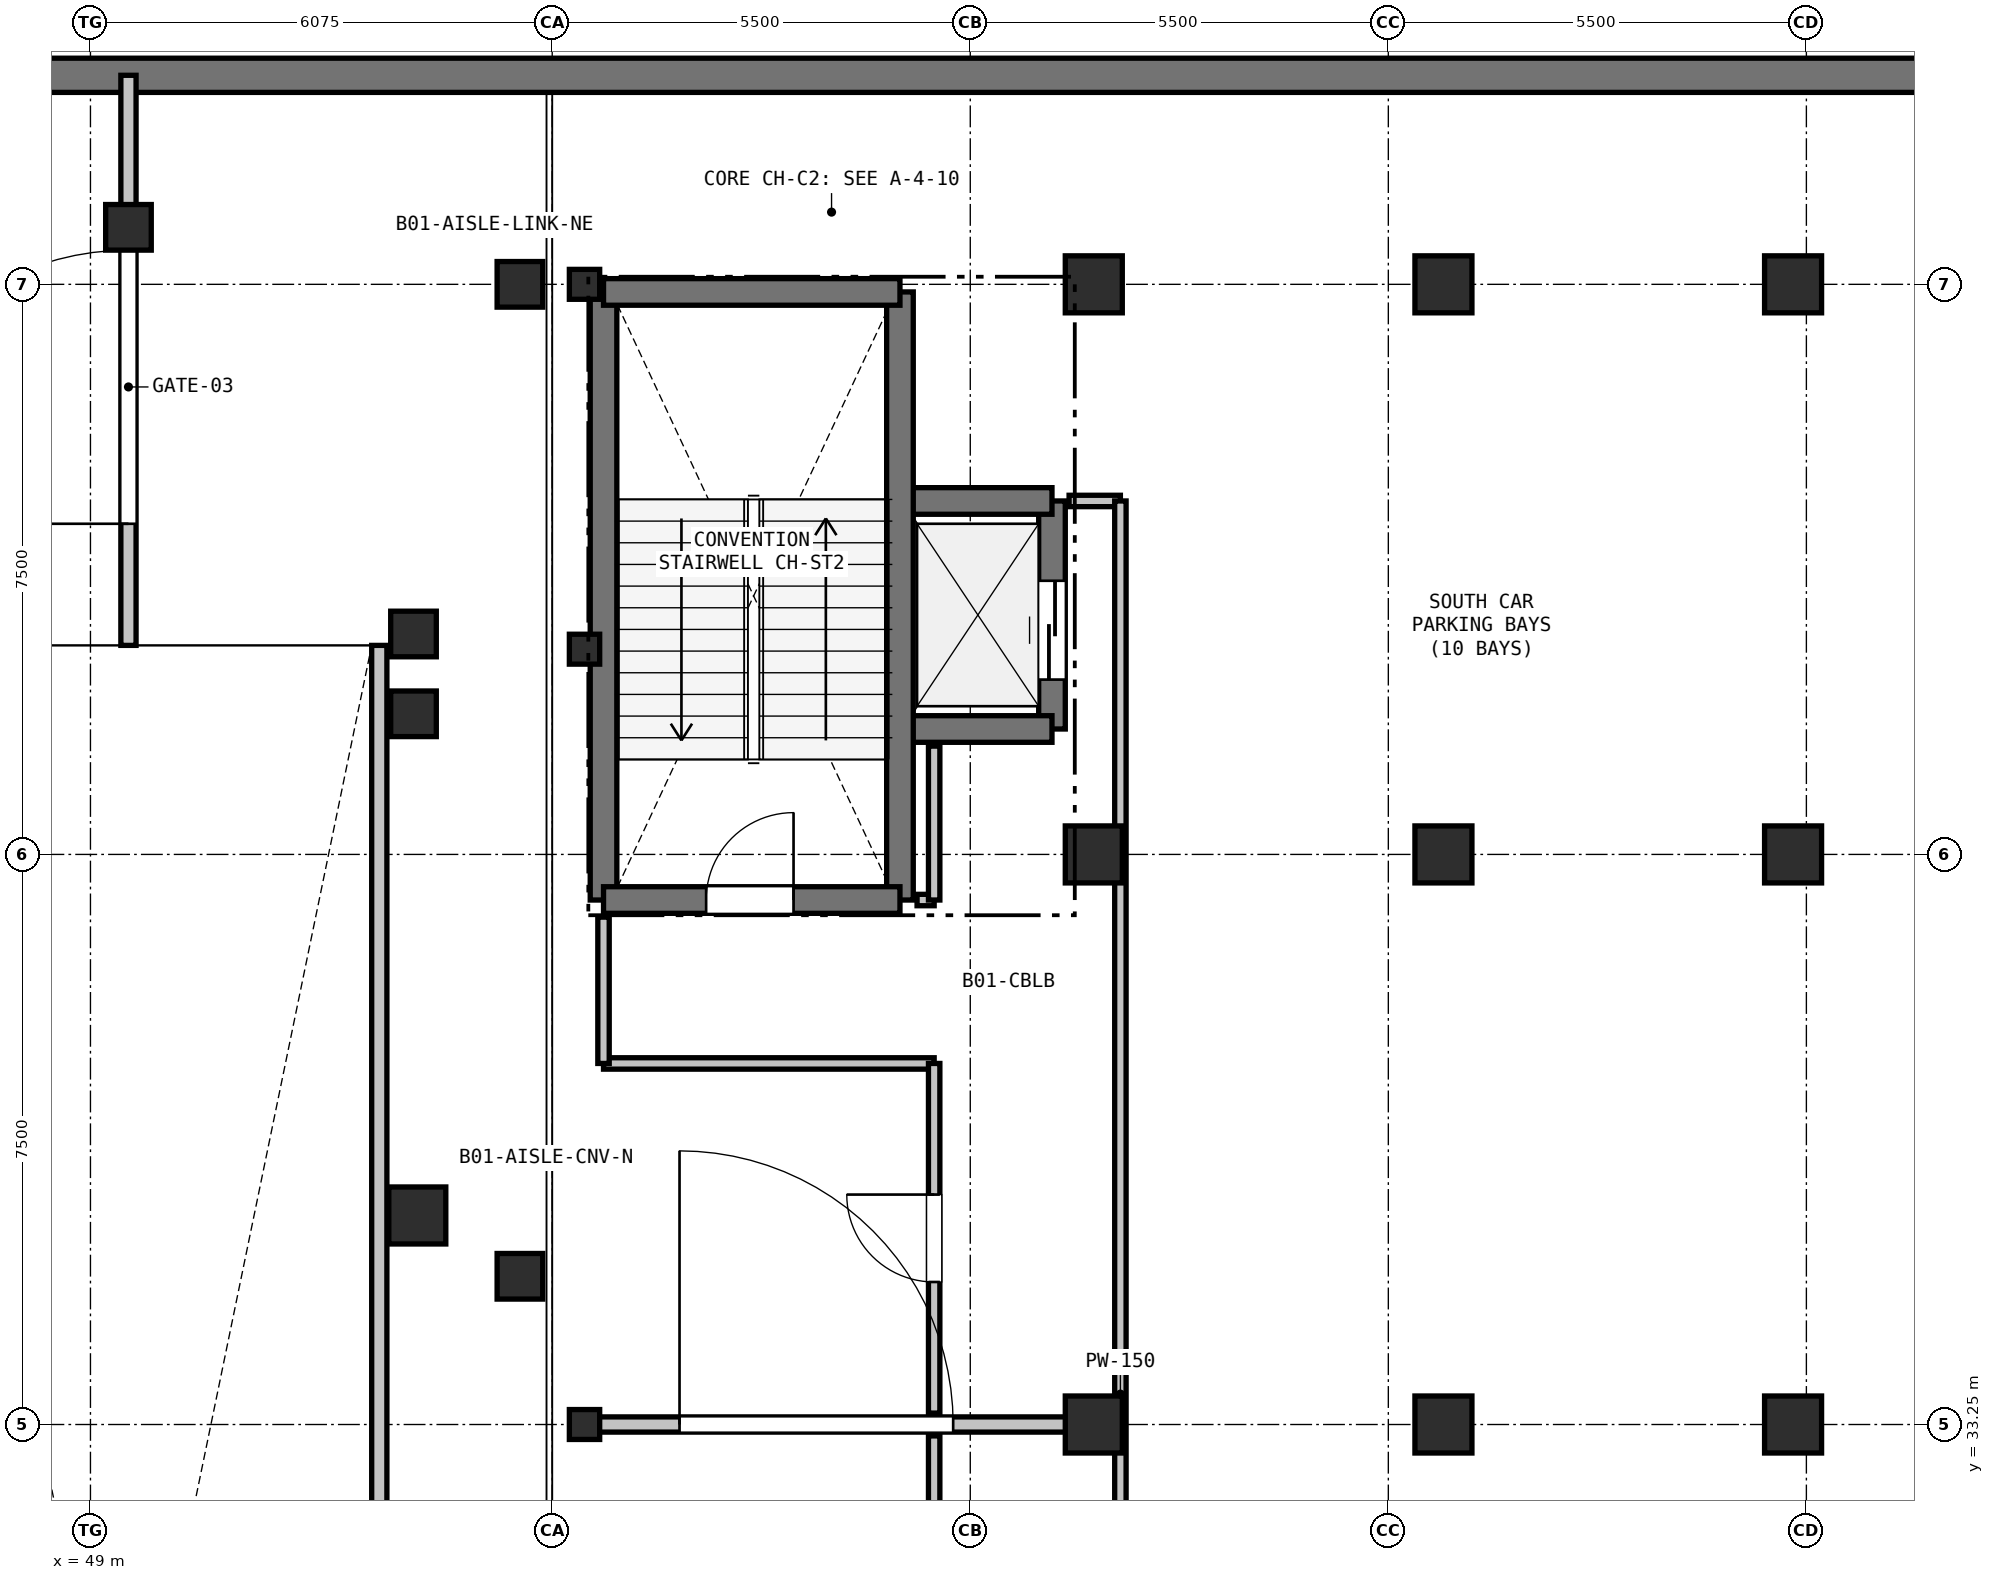
"""IFC4 building model, lengths in metres.
Left out: names, types, materials, properties, quantities, classifications, styles, units other than length and angle.
Written with IfcOpenShell. Run it as: python <this file> out.ifc"""

import sys

from ifc_helpers import new_model, si_unit, direction, frame, frame_2d, origin, origin_2d, place, context, subcontext, project, spatial, rectangle, i_section, extrude, element, fill, save


model = new_model("IFC4")
c1 = context("Model", 3, precision=1e-05, world=origin(), true_north=direction((0.0, 1.0)))
c2 = subcontext(c1, "Body", "Model", "MODEL_VIEW")
j1 = project(units=[si_unit("LENGTHUNIT", "METRE"), si_unit("PLANEANGLEUNIT", "RADIAN")], contexts=[c1])
p1 = place(None, origin())
s1 = spatial("IfcSite", under=j1, at=p1, CompositionType="ELEMENT")
p2 = place(p1, origin())
s2 = spatial("IfcBuilding", under=s1, at=p2, CompositionType="ELEMENT")
p3 = place(p2, frame((0.0, 0.0, -4.5)))
s3 = spatial("IfcBuildingStorey", under=s2, at=p3, CompositionType="ELEMENT", Elevation=-4.5)
p4 = place(p3, frame((77.0, 51.0, 0.0), z_axis=(0.0, 0.0, 1.0), x_axis=(-1.0, 0.0, 0.0)))
e1 = element("IfcWall", 1, at=p4, inside=s3, PredefinedType="USERDEFINED", context=c2, shape_type="SweptSolid", body=[
    extrude(rectangle(XDim=81.5, YDim=0.45, at=frame_2d((40.75, 0.0))), origin(), (0.0, 0.0, 1.0), 4.5),
])
for number, where, z_axis, x_axis in (
    (2, (53.25, 42.6, 0.0), (0.0, 0.0, 1.0), (1.0, 0.0, 0.0)),
    (3, (49.5, 49.0, 0.0), (0.0, 0.0, 1.0), (1.0, 0.0, 0.0)),
    (4, (53.25, 43.65, 0.0), (0.0, 0.0, 1.0), (1.0, 0.0, 0.0)),
):
    element("IfcColumn", number, at=place(p3, frame(where, z_axis=z_axis, x_axis=x_axis)), inside=s3, PredefinedType="COLUMN", context=c2, shape_type="SweptSolid", body=[
        extrude(rectangle(XDim=0.6, YDim=0.6, at=origin_2d()), origin(), (0.0, 0.0, 1.0), 4.5),
    ])
p5 = place(p3, frame((53.3, 36.0, 0.0), z_axis=(0.0, 0.0, 1.0), x_axis=(1.0, 0.0, 0.0)))
e5 = element("IfcColumn", 5, at=p5, inside=s3, PredefinedType="COLUMN", context=c2, shape_type="SweptSolid", body=[
    extrude(rectangle(XDim=0.75, YDim=0.75, at=origin_2d()), origin(), (0.0, 0.0, 1.0), 4.5),
])
for number, where, z_axis, x_axis in (
    (6, (54.65, 35.2, 0.0), (0.0, 0.0, 1.0), (1.0, 0.0, 0.0)),
    (7, (54.65, 48.25, 0.0), (0.0, 0.0, 1.0), (1.0, 0.0, 0.0)),
):
    element("IfcColumn", number, at=place(p3, frame(where, z_axis=z_axis, x_axis=x_axis)), inside=s3, PredefinedType="COLUMN", context=c2, shape_type="SweptSolid", body=[
        extrude(rectangle(XDim=0.6, YDim=0.6, at=origin_2d()), origin(), (0.0, 0.0, 1.0), 4.2),
    ])
for number, where, z_axis, x_axis in (
    (8, (55.5, 33.25, 0.0), (0.0, 0.0, 1.0), (1.0, 0.0, 0.0)),
    (9, (55.5, 43.45, 0.0), (0.0, 0.0, 1.0), (1.0, 0.0, 0.0)),
    (10, (55.5, 48.25, 0.0), (0.0, 0.0, 1.0), (1.0, 0.0, 0.0)),
):
    element("IfcColumn", number, at=place(p3, frame(where, z_axis=z_axis, x_axis=x_axis)), inside=s3, PredefinedType="COLUMN", context=c2, shape_type="SweptSolid", body=[
        extrude(i_section(OverallWidth=0.399, OverallDepth=0.394, WebThickness=0.023, FlangeThickness=0.037, at=origin_2d()), origin(), (0.0, 0.0, 1.0), 4.5),
    ])
for number, where, z_axis, x_axis in (
    (11, (62.2, 33.25, 0.0), (0.0, 0.0, 1.0), (1.0, 0.0, 0.0)),
    (12, (62.2, 40.75, 0.0), (0.0, 0.0, 1.0), (1.0, 0.0, 0.0)),
    (13, (62.2, 48.25, 0.0), (0.0, 0.0, 1.0), (1.0, 0.0, 0.0)),
    (14, (66.8, 33.25, 0.0), (0.0, 0.0, 1.0), (1.0, 0.0, 0.0)),
    (15, (66.8, 40.75, 0.0), (0.0, 0.0, 1.0), (1.0, 0.0, 0.0)),
    (16, (66.8, 48.25, 0.0), (0.0, 0.0, 1.0), (1.0, 0.0, 0.0)),
    (17, (71.4, 33.25, 0.0), (0.0, 0.0, 1.0), (1.0, 0.0, 0.0)),
    (18, (71.4, 40.75, 0.0), (0.0, 0.0, 1.0), (1.0, 0.0, 0.0)),
    (19, (71.4, 48.25, 0.0), (0.0, 0.0, 1.0), (1.0, 0.0, 0.0)),
):
    element("IfcColumn", number, at=place(p3, frame(where, z_axis=z_axis, x_axis=x_axis)), inside=s3, PredefinedType="COLUMN", context=c2, shape_type="SweptSolid", body=[
        extrude(rectangle(XDim=0.75, YDim=0.75, at=origin_2d()), origin(), (0.0, 0.0, 1.0), 4.5),
    ])
p6 = place(p3, frame((52.8, 43.5, 0.0), z_axis=(0.0, 0.0, 1.0), x_axis=(0.0, -1.0, 0.0)))
e20 = element("IfcWall", 20, at=p6, inside=s3, PredefinedType="PARAPET", context=c2, shape_type="SweptSolid", body=[
    extrude(rectangle(XDim=31.65, YDim=0.2, at=frame_2d((15.825, 0.0))), origin(), (0.0, 0.0, 1.0), 5.75),
])
p7 = place(p3, frame((61.65, 42.4, 0.0), z_axis=(0.0, 0.0, 1.0), x_axis=(0.0, 1.0, 0.0)))
e21 = element("IfcWall", 21, at=p7, inside=s3, PredefinedType="SHEAR", context=c2, shape_type="SweptSolid", body=[
    extrude(rectangle(XDim=3.0, YDim=0.35, at=frame_2d((1.5, 0.0))), origin(), (0.0, 0.0, 1.0), 4.2),
])
p8 = place(p7, frame((0.65, 0.0, 0.0)))
e22 = element("IfcOpeningElement", 22, at=p8, cuts=e21, PredefinedType="OPENING", context=c2, shape_type="SweptSolid", body=[
    extrude(rectangle(XDim=1.3, YDim=2.2, at=frame_2d((0.65, 1.1))), frame((0.0, 0.185, 0.0), z_axis=(0.0, -1.0, 0.0), x_axis=(1.0, 0.0, 0.0)), (0.0, 0.0, 1.0), 0.37),
])
for number, where, z_axis, x_axis in (
    (23, (59.65, 45.4, 0.0), (0.0, 0.0, 1.0), (1.0, 0.0, 0.0)),
    (24, (59.65, 42.4, 0.0), (0.0, 0.0, 1.0), (1.0, 0.0, 0.0)),
):
    element("IfcWall", number, at=place(p3, frame(where, z_axis=z_axis, x_axis=x_axis)), inside=s3, PredefinedType="SHEAR", context=c2, shape_type="SweptSolid", body=[
        extrude(rectangle(XDim=2.0, YDim=0.35, at=frame_2d((1.0, 0.0))), origin(), (0.0, 0.0, 1.0), 4.2),
    ])
for number, where, z_axis, x_axis in (
    (25, (59.65, 48.15, 0.0), (0.0, 0.0, 1.0), (0.0, -1.0, 0.0)),
    (26, (55.75, 40.15, 0.0), (0.0, 0.0, 1.0), (0.0, 1.0, 0.0)),
):
    element("IfcWall", number, at=place(p3, frame(where, z_axis=z_axis, x_axis=x_axis)), inside=s3, PredefinedType="SHEAR", context=c2, shape_type="SweptSolid", body=[
        extrude(rectangle(XDim=8.0, YDim=0.35, at=frame_2d((4.0, 0.0))), origin(), (0.0, 0.0, 1.0), 4.2),
    ])
p9 = place(p3, frame((55.75, 48.15, 0.0), z_axis=(0.0, 0.0, 1.0), x_axis=(1.0, 0.0, 0.0)))
e27 = element("IfcWall", 27, at=p9, inside=s3, PredefinedType="SHEAR", context=c2, shape_type="SweptSolid", body=[
    extrude(rectangle(XDim=3.9, YDim=0.35, at=frame_2d((1.95, 0.0))), origin(), (0.0, 0.0, 1.0), 4.2),
])
p10 = place(p3, frame((55.75, 40.15, 0.0), z_axis=(0.0, 0.0, 1.0), x_axis=(1.0, 0.0, 0.0)))
e28 = element("IfcWall", 28, at=p10, inside=s3, PredefinedType="SHEAR", context=c2, shape_type="SweptSolid", body=[
    extrude(rectangle(XDim=3.9, YDim=0.35, at=frame_2d((1.95, 0.0))), origin(), (0.0, 0.0, 1.0), 4.2),
])
p11 = place(p10, frame((1.35, 0.0, 0.0)))
e29 = element("IfcOpeningElement", 29, at=p11, cuts=e28, PredefinedType="OPENING", context=c2, shape_type="SweptSolid", body=[
    extrude(rectangle(XDim=1.15, YDim=2.15, at=frame_2d((0.575, 1.075))), frame((0.0, 0.185, 0.0), z_axis=(0.0, -1.0, 0.0), x_axis=(1.0, 0.0, 0.0)), (0.0, 0.0, 1.0), 0.37),
])
p12 = place(p3, frame((49.5, 43.5, 0.0), z_axis=(0.0, 0.0, 1.0), x_axis=(0.0, 1.0, 0.0)))
e30 = element("IfcWall", 30, at=p12, inside=s3, PredefinedType="PARTITIONING", context=c2, shape_type="SweptSolid", body=[
    extrude(rectangle(XDim=7.5, YDim=0.2, at=frame_2d((3.75, 0.0))), origin(), (0.0, 0.0, 1.0), 4.2),
])
p13 = place(p12, frame((1.6, 0.0, 0.0)))
e31 = element("IfcOpeningElement", 31, at=p13, cuts=e30, PredefinedType="OPENING", context=c2, shape_type="SweptSolid", body=[
    extrude(rectangle(XDim=3.6, YDim=2.8, at=frame_2d((1.8, 1.4))), frame((0.0, 0.11, 0.0), z_axis=(0.0, -1.0, 0.0), x_axis=(1.0, 0.0, 0.0)), (0.0, 0.0, 1.0), 0.22),
])
p14 = place(p3, frame((55.5, 33.25, 0.0), z_axis=(0.0, 0.0, 1.0), x_axis=(1.0, 0.0, 0.0)))
e32 = element("IfcWall", 32, at=p14, inside=s3, PredefinedType="PARTITIONING", context=c2, shape_type="SweptSolid", body=[
    extrude(rectangle(XDim=6.7, YDim=0.2, at=frame_2d((3.35, 0.0))), origin(), (0.0, 0.0, 1.0), 4.2),
])
p15 = place(p14, frame((1.25, 0.0, 0.0)))
e33 = element("IfcOpeningElement", 33, at=p15, cuts=e32, PredefinedType="OPENING", context=c2, shape_type="SweptSolid", body=[
    extrude(rectangle(XDim=3.6, YDim=2.8, at=frame_2d((1.8, 1.4))), frame((0.0, 0.11, 0.0), z_axis=(0.0, -1.0, 0.0), x_axis=(1.0, 0.0, 0.0)), (0.0, 0.0, 1.0), 0.22),
])
p16 = place(p3, frame((60.1, 38.0, 0.0), z_axis=(0.0, 0.0, 1.0), x_axis=(-1.0, 0.0, 0.0)))
e34 = element("IfcWall", 34, at=p16, inside=s3, PredefinedType="PARTITIONING", context=c2, shape_type="SweptSolid", body=[
    extrude(rectangle(XDim=4.35, YDim=0.15, at=frame_2d((2.175, 0.0))), origin(), (0.0, 0.0, 1.0), 4.2),
])
p17 = place(p3, frame((55.75, 38.0, 0.0), z_axis=(0.0, 0.0, 1.0), x_axis=(0.0, 1.0, 0.0)))
e35 = element("IfcWall", 35, at=p17, inside=s3, PredefinedType="PARTITIONING", context=c2, shape_type="SweptSolid", body=[
    extrude(rectangle(XDim=1.925, YDim=0.15, at=frame_2d((0.962, 0.0))), origin(), (0.0, 0.0, 1.0), 4.2),
])
p18 = place(p3, frame((59.875, 40.15, 0.0), z_axis=(0.0, 0.0, 1.0), x_axis=(1.0, 0.0, 0.0)))
e36 = element("IfcWall", 36, at=p18, inside=s3, PredefinedType="PARTITIONING", context=c2, shape_type="SweptSolid", body=[
    extrude(rectangle(XDim=0.225, YDim=0.15, at=frame_2d((0.113, 0.0))), origin(), (0.0, 0.0, 1.0), 4.2),
])
p19 = place(p3, frame((60.1, 40.15, 0.0), z_axis=(0.0, 0.0, 1.0), x_axis=(0.0, 1.0, 0.0)))
e37 = element("IfcWall", 37, at=p19, inside=s3, PredefinedType="PARTITIONING", context=c2, shape_type="SweptSolid", body=[
    extrude(rectangle(XDim=2.025, YDim=0.15, at=frame_2d((1.013, 0.0))), origin(), (0.0, 0.0, 1.0), 4.2),
])
p20 = place(p3, frame((61.875, 45.4, 0.0), z_axis=(0.0, 0.0, 1.0), x_axis=(1.0, 0.0, 0.0)))
e38 = element("IfcWall", 38, at=p20, inside=s3, PredefinedType="PARTITIONING", context=c2, shape_type="SweptSolid", body=[
    extrude(rectangle(XDim=0.675, YDim=0.15, at=frame_2d((0.337, 0.0))), origin(), (0.0, 0.0, 1.0), 4.2),
])
p21 = place(p3, frame((62.55, 45.4, 0.0), z_axis=(0.0, 0.0, 1.0), x_axis=(0.0, -1.0, 0.0)))
e39 = element("IfcWall", 39, at=p21, inside=s3, PredefinedType="PARTITIONING", context=c2, shape_type="SweptSolid", body=[
    extrude(rectangle(XDim=23.5, YDim=0.15, at=frame_2d((11.75, 0.0))), origin(), (0.0, 0.0, 1.0), 4.2),
])
p22 = place(p3, frame((60.1, 18.4, 0.0), z_axis=(0.0, 0.0, 1.0), x_axis=(0.0, 1.0, 0.0)))
e40 = element("IfcWall", 40, at=p22, inside=s3, PredefinedType="PARTITIONING", context=c2, shape_type="SweptSolid", body=[
    extrude(rectangle(XDim=14.7, YDim=0.15, at=frame_2d((7.35, 0.0))), origin(), (0.0, 0.0, 1.0), 4.2),
])
p23 = place(p22, frame((6.775, 0.0, 0.0)))
e41 = element("IfcOpeningElement", 41, at=p23, cuts=e40, PredefinedType="OPENING", context=c2, shape_type="SweptSolid", body=[
    extrude(rectangle(XDim=1.15, YDim=2.15, at=frame_2d((0.575, 1.075))), frame((0.0, 0.085, 0.0), z_axis=(0.0, -1.0, 0.0), x_axis=(1.0, 0.0, 0.0)), (0.0, 0.0, 1.0), 0.17),
])
p24 = place(p3, frame((60.1, 33.4, 0.0), z_axis=(0.0, 0.0, 1.0), x_axis=(0.0, 1.0, 0.0)))
e42 = element("IfcWall", 42, at=p24, inside=s3, PredefinedType="PARTITIONING", context=c2, shape_type="SweptSolid", body=[
    extrude(rectangle(XDim=4.6, YDim=0.15, at=frame_2d((2.3, 0.0))), origin(), (0.0, 0.0, 1.0), 4.2),
])
p25 = place(p24, frame((1.725, 0.0, 0.0)))
e43 = element("IfcOpeningElement", 43, at=p25, cuts=e42, PredefinedType="OPENING", context=c2, shape_type="SweptSolid", body=[
    extrude(rectangle(XDim=1.15, YDim=2.15, at=frame_2d((0.575, 1.075))), frame((0.0, 0.085, 0.0), z_axis=(0.0, -1.0, 0.0), x_axis=(1.0, 0.0, 0.0)), (0.0, 0.0, 1.0), 0.17),
])
p26 = place(p8, origin())
e44 = element("IfcDoor", 44, at=p26, inside=s3, OperationType="SLIDING_TO_LEFT", PredefinedType="DOOR", context=c2, shape_type="SweptSolid", body=[
    extrude(rectangle(XDim=1.3, YDim=2.2, at=frame_2d((0.65, 1.1))), frame((0.0, 0.025, 0.0), z_axis=(0.0, -1.0, 0.0), x_axis=(1.0, 0.0, 0.0)), (0.0, 0.0, 1.0), 0.05),
])
fill(e22, e44)
p27 = place(p11, origin())
e45 = element("IfcDoor", 45, at=p27, inside=s3, OperationType="SINGLE_SWING_RIGHT", PredefinedType="DOOR", context=c2, shape_type="SweptSolid", body=[
    extrude(rectangle(XDim=1.15, YDim=2.15, at=frame_2d((0.575, 1.075))), frame((0.0, 0.025, 0.0), z_axis=(0.0, -1.0, 0.0), x_axis=(1.0, 0.0, 0.0)), (0.0, 0.0, 1.0), 0.05),
])
fill(e29, e45)
p28 = place(p13, origin())
e46 = element("IfcDoor", 46, at=p28, inside=s3, OperationType="ROLLINGUP", PredefinedType="GATE", context=c2, shape_type="SweptSolid", body=[
    extrude(rectangle(XDim=3.6, YDim=2.8, at=frame_2d((1.8, 1.4))), frame((0.0, 0.025, 0.0), z_axis=(0.0, -1.0, 0.0), x_axis=(1.0, 0.0, 0.0)), (0.0, 0.0, 1.0), 0.05),
])
fill(e31, e46)
p29 = place(p15, origin())
e47 = element("IfcDoor", 47, at=p29, inside=s3, OperationType="ROLLINGUP", PredefinedType="GATE", context=c2, shape_type="SweptSolid", body=[
    extrude(rectangle(XDim=3.6, YDim=2.8, at=frame_2d((1.8, 1.4))), frame((0.0, 0.025, 0.0), z_axis=(0.0, -1.0, 0.0), x_axis=(1.0, 0.0, 0.0)), (0.0, 0.0, 1.0), 0.05),
])
fill(e33, e47)
p30 = place(p25, origin())
e48 = element("IfcDoor", 48, at=p30, inside=s3, OperationType="SINGLE_SWING_RIGHT", PredefinedType="DOOR", context=c2, shape_type="SweptSolid", body=[
    extrude(rectangle(XDim=1.15, YDim=2.15, at=frame_2d((0.575, 1.075))), frame((0.0, 0.025, 0.0), z_axis=(0.0, -1.0, 0.0), x_axis=(1.0, 0.0, 0.0)), (0.0, 0.0, 1.0), 0.05),
])
fill(e43, e48)
save(model, sys.argv[1])
